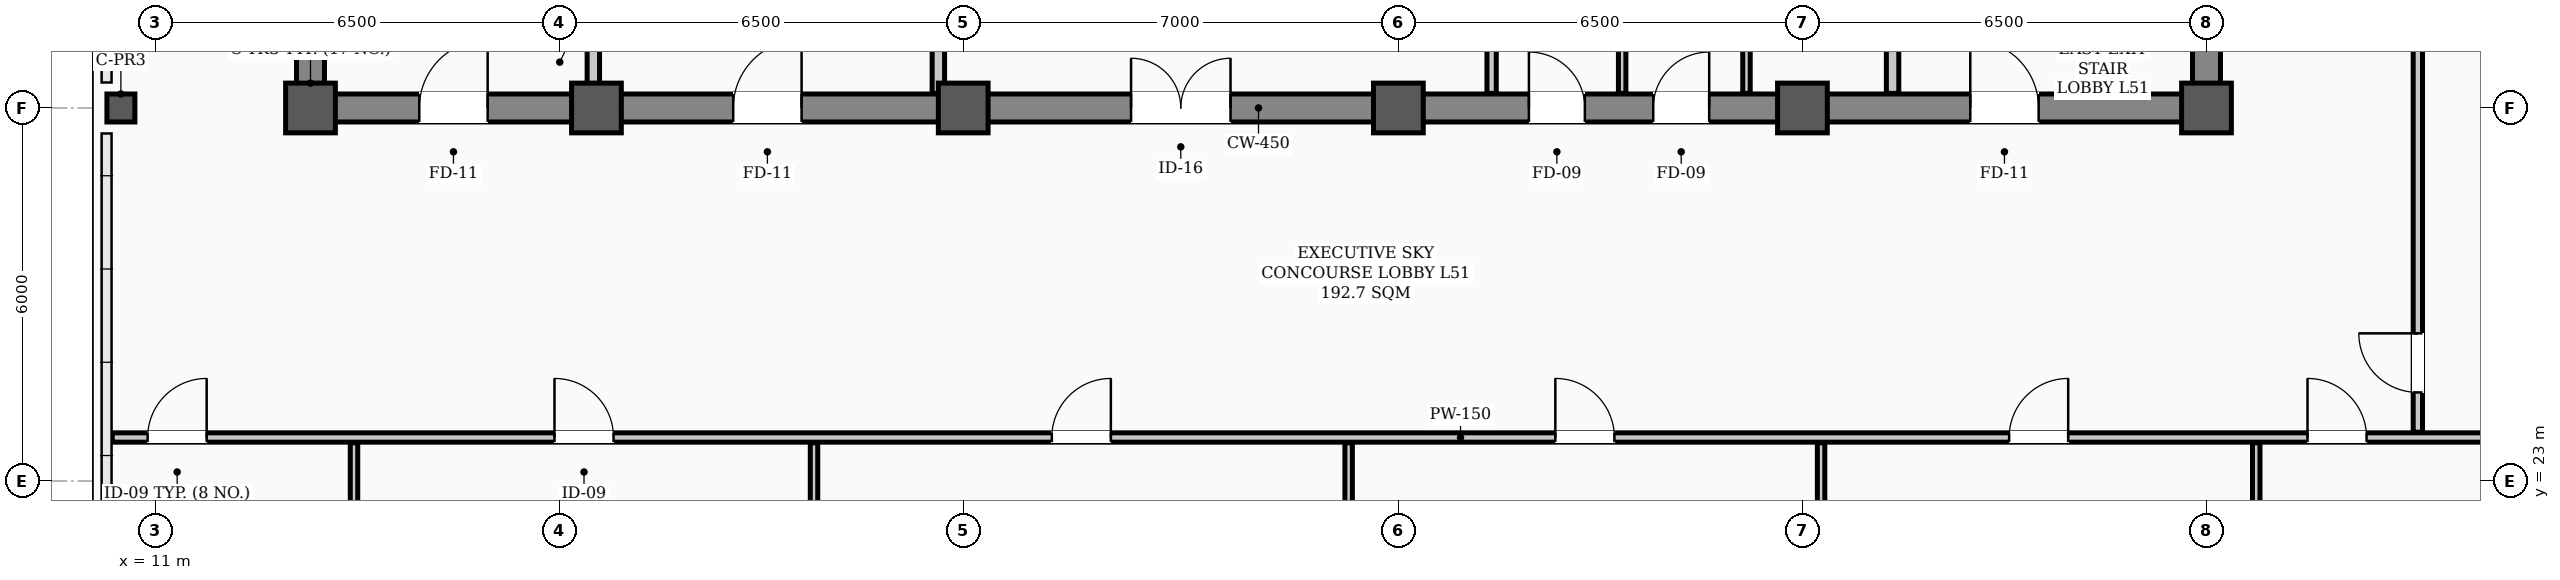
"""IFC4 building model, lengths in metres.
Left out: names, types, materials, properties, quantities, classifications, styles, units other than length and angle.
Written with IfcOpenShell. Run it as: python <this file> out.ifc"""

import sys

from ifc_helpers import new_model, si_unit, direction, frame, frame_2d, origin, origin_2d, place, context, subcontext, project, spatial, rectangle, hollow_rectangle, extrude, element, fill, save


model = new_model("IFC4")
c1 = context("Model", 3, precision=1e-05, world=origin(), true_north=direction((0.0, 1.0)))
c2 = subcontext(c1, "Body", "Model", "MODEL_VIEW")
j1 = project(units=[si_unit("LENGTHUNIT", "METRE"), si_unit("PLANEANGLEUNIT", "RADIAN")], contexts=[c1])
p1 = place(None, origin())
s1 = spatial("IfcSite", under=j1, at=p1, CompositionType="ELEMENT")
p2 = place(p1, origin())
s2 = spatial("IfcBuilding", under=s1, at=p2, CompositionType="ELEMENT")
p3 = place(p2, frame((0.0, 0.0, 206.1)))
s3 = spatial("IfcBuildingStorey", under=s2, at=p3, CompositionType="ELEMENT", Elevation=206.1)
for number, where, z_axis, x_axis in (
    (1, (13.5, 29.0, 0.0), (0.0, 0.0, 1.0), (1.0, 0.0, 0.0)),
    (2, (18.1, 29.0, 0.0), (0.0, 0.0, 1.0), (1.0, 0.0, 0.0)),
    (3, (24.0, 29.0, 0.0), (0.0, 0.0, 1.0), (1.0, 0.0, 0.0)),
    (4, (31.0, 29.0, 0.0), (0.0, 0.0, 1.0), (1.0, 0.0, 0.0)),
    (5, (37.5, 29.0, 0.0), (0.0, 0.0, 1.0), (1.0, 0.0, 0.0)),
    (6, (44.0, 29.0, 0.0), (0.0, 0.0, 1.0), (1.0, 0.0, 0.0)),
):
    element("IfcColumn", number, at=place(p3, frame(where, z_axis=z_axis, x_axis=x_axis)), inside=s3, PredefinedType="COLUMN", context=c2, shape_type="SweptSolid", body=[
        extrude(hollow_rectangle(XDim=0.8, YDim=0.8, WallThickness=0.032, InnerFilletRadius=0.016, OuterFilletRadius=0.048, at=origin_2d()), origin(), (0.0, 0.0, 1.0), 5.0),
    ])
p4 = place(p3, frame((10.45, 29.0, 0.0), z_axis=(0.0, 0.0, 1.0), x_axis=(1.0, 0.0, 0.0)))
e7 = element("IfcColumn", 7, at=p4, inside=s3, PredefinedType="COLUMN", context=c2, shape_type="SweptSolid", body=[
    extrude(hollow_rectangle(XDim=0.45, YDim=0.45, WallThickness=0.022, InnerFilletRadius=0.022, OuterFilletRadius=0.044, at=origin_2d()), origin(), (0.0, 0.0, 1.0), 5.0),
])
p5 = place(p3, frame((13.5, 29.0, 0.0), z_axis=(0.0, 0.0, 1.0), x_axis=(1.0, 0.0, 0.0)))
e8 = element("IfcWall", 8, at=p5, inside=s3, PredefinedType="SHEAR", context=c2, shape_type="SweptSolid", body=[
    extrude(rectangle(XDim=30.5, YDim=0.45, at=frame_2d((15.25, 0.0))), origin(), (0.0, 0.0, 1.0), 4.82),
])
p6 = place(p5, frame((1.75, 0.0, 0.0)))
e9 = element("IfcOpeningElement", 9, at=p6, cuts=e8, PredefinedType="OPENING", context=c2, shape_type="SweptSolid", body=[
    extrude(rectangle(XDim=1.1, YDim=2.08, at=frame_2d((0.55, 1.04))), frame((0.0, 0.235, 0.0), z_axis=(0.0, -1.0, 0.0), x_axis=(1.0, 0.0, 0.0)), (0.0, 0.0, 1.0), 0.47),
])
p7 = place(p5, frame((26.7, 0.0, 0.0)))
e10 = element("IfcOpeningElement", 10, at=p7, cuts=e8, PredefinedType="OPENING", context=c2, shape_type="SweptSolid", body=[
    extrude(rectangle(XDim=1.1, YDim=2.08, at=frame_2d((0.55, 1.04))), frame((0.0, 0.235, 0.0), z_axis=(0.0, -1.0, 0.0), x_axis=(1.0, 0.0, 0.0)), (0.0, 0.0, 1.0), 0.47),
])
p8 = place(p5, frame((6.8, 0.0, 0.0)))
e11 = element("IfcOpeningElement", 11, at=p8, cuts=e8, PredefinedType="OPENING", context=c2, shape_type="SweptSolid", body=[
    extrude(rectangle(XDim=1.1, YDim=2.08, at=frame_2d((0.55, 1.04))), frame((0.0, 0.235, 0.0), z_axis=(0.0, -1.0, 0.0), x_axis=(1.0, 0.0, 0.0)), (0.0, 0.0, 1.0), 0.47),
])
p9 = place(p5, frame((13.2, 0.0, 0.0)))
e12 = element("IfcOpeningElement", 12, at=p9, cuts=e8, PredefinedType="OPENING", context=c2, shape_type="SweptSolid", body=[
    extrude(rectangle(XDim=1.6, YDim=2.08, at=frame_2d((0.8, 1.04))), frame((0.0, 0.235, 0.0), z_axis=(0.0, -1.0, 0.0), x_axis=(1.0, 0.0, 0.0)), (0.0, 0.0, 1.0), 0.47),
])
p10 = place(p5, frame((19.6, 0.0, 0.0)))
e13 = element("IfcOpeningElement", 13, at=p10, cuts=e8, PredefinedType="OPENING", context=c2, shape_type="SweptSolid", body=[
    extrude(rectangle(XDim=0.9, YDim=2.08, at=frame_2d((0.45, 1.04))), frame((0.0, 0.235, 0.0), z_axis=(0.0, -1.0, 0.0), x_axis=(1.0, 0.0, 0.0)), (0.0, 0.0, 1.0), 0.47),
])
p11 = place(p5, frame((21.6, 0.0, 0.0)))
e14 = element("IfcOpeningElement", 14, at=p11, cuts=e8, PredefinedType="OPENING", context=c2, shape_type="SweptSolid", body=[
    extrude(rectangle(XDim=0.9, YDim=2.08, at=frame_2d((0.45, 1.04))), frame((0.0, 0.235, 0.0), z_axis=(0.0, -1.0, 0.0), x_axis=(1.0, 0.0, 0.0)), (0.0, 0.0, 1.0), 0.47),
])
for number, where, z_axis, x_axis in (
    (15, (13.5, 29.35, 0.0), (0.0, 0.0, 1.0), (0.0, 1.0, 0.0)),
    (16, (44.0, 29.35, 0.0), (0.0, 0.0, 1.0), (0.0, 1.0, 0.0)),
):
    element("IfcWall", number, at=place(p3, frame(where, z_axis=z_axis, x_axis=x_axis)), inside=s3, PredefinedType="SHEAR", context=c2, shape_type="SweptSolid", body=[
        extrude(rectangle(XDim=8.6, YDim=0.45, at=frame_2d((4.3, 0.0))), origin(), (0.0, 0.0, 1.0), 4.82),
    ])
p12 = place(p3, frame((10.31, 23.7, 0.0), z_axis=(0.0, 0.0, 1.0), x_axis=(1.0, 0.0, 0.0)))
e17 = element("IfcWall", 17, at=p12, inside=s3, PredefinedType="PARTITIONING", context=c2, shape_type="SweptSolid", body=[
    extrude(rectangle(XDim=43.38, YDim=0.15, at=frame_2d((21.69, 0.0))), origin(), (0.0, 0.0, 1.0), 4.3),
])
p13 = place(p12, frame((0.57, 0.0, 0.0)))
e18 = element("IfcOpeningElement", 18, at=p13, cuts=e17, PredefinedType="OPENING", context=c2, shape_type="SweptSolid", body=[
    extrude(rectangle(XDim=0.95, YDim=2.08, at=frame_2d((0.475, 1.04))), frame((0.0, 0.085, 0.0), z_axis=(0.0, -1.0, 0.0), x_axis=(1.0, 0.0, 0.0)), (0.0, 0.0, 1.0), 0.17),
])
p14 = place(p12, frame((7.115, 0.0, 0.0)))
e19 = element("IfcOpeningElement", 19, at=p14, cuts=e17, PredefinedType="OPENING", context=c2, shape_type="SweptSolid", body=[
    extrude(rectangle(XDim=0.95, YDim=2.08, at=frame_2d((0.475, 1.04))), frame((0.0, 0.085, 0.0), z_axis=(0.0, -1.0, 0.0), x_axis=(1.0, 0.0, 0.0)), (0.0, 0.0, 1.0), 0.17),
])
p15 = place(p12, frame((15.115, 0.0, 0.0)))
e20 = element("IfcOpeningElement", 20, at=p15, cuts=e17, PredefinedType="OPENING", context=c2, shape_type="SweptSolid", body=[
    extrude(rectangle(XDim=0.95, YDim=2.08, at=frame_2d((0.475, 1.04))), frame((0.0, 0.085, 0.0), z_axis=(0.0, -1.0, 0.0), x_axis=(1.0, 0.0, 0.0)), (0.0, 0.0, 1.0), 0.17),
])
p16 = place(p12, frame((23.215, 0.0, 0.0)))
e21 = element("IfcOpeningElement", 21, at=p16, cuts=e17, PredefinedType="OPENING", context=c2, shape_type="SweptSolid", body=[
    extrude(rectangle(XDim=0.95, YDim=2.08, at=frame_2d((0.475, 1.04))), frame((0.0, 0.085, 0.0), z_axis=(0.0, -1.0, 0.0), x_axis=(1.0, 0.0, 0.0)), (0.0, 0.0, 1.0), 0.17),
])
p17 = place(p12, frame((30.515, 0.0, 0.0)))
e22 = element("IfcOpeningElement", 22, at=p17, cuts=e17, PredefinedType="OPENING", context=c2, shape_type="SweptSolid", body=[
    extrude(rectangle(XDim=0.95, YDim=2.08, at=frame_2d((0.475, 1.04))), frame((0.0, 0.085, 0.0), z_axis=(0.0, -1.0, 0.0), x_axis=(1.0, 0.0, 0.0)), (0.0, 0.0, 1.0), 0.17),
])
p18 = place(p12, frame((35.315, 0.0, 0.0)))
e23 = element("IfcOpeningElement", 23, at=p18, cuts=e17, PredefinedType="OPENING", context=c2, shape_type="SweptSolid", body=[
    extrude(rectangle(XDim=0.95, YDim=2.08, at=frame_2d((0.475, 1.04))), frame((0.0, 0.085, 0.0), z_axis=(0.0, -1.0, 0.0), x_axis=(1.0, 0.0, 0.0)), (0.0, 0.0, 1.0), 0.17),
])
for number, where, z_axis, x_axis in (
    (24, (18.05, 29.235, 0.0), (0.0, 0.0, 1.0), (0.0, 1.0, 0.0)),
    (25, (38.95, 29.235, 0.0), (0.0, 0.0, 1.0), (0.0, 1.0, 0.0)),
):
    element("IfcWall", number, at=place(p3, frame(where, z_axis=z_axis, x_axis=x_axis)), inside=s3, PredefinedType="STANDARD", context=c2, shape_type="SweptSolid", body=[
        extrude(rectangle(XDim=1.065, YDim=0.2, at=frame_2d((0.532, 0.0))), origin(), (0.0, 0.0, 1.0), 4.45),
    ])
p19 = place(p3, frame((23.6, 29.235, 0.0), z_axis=(0.0, 0.0, 1.0), x_axis=(0.0, 1.0, 0.0)))
e26 = element("IfcWall", 26, at=p19, inside=s3, PredefinedType="STANDARD", context=c2, shape_type="SweptSolid", body=[
    extrude(rectangle(XDim=5.465, YDim=0.2, at=frame_2d((2.732, 0.0))), origin(), (0.0, 0.0, 1.0), 4.3),
])
p20 = place(p3, frame((32.5, 29.235, 0.0), z_axis=(0.0, 0.0, 1.0), x_axis=(0.0, 1.0, 0.0)))
e27 = element("IfcWall", 27, at=p20, inside=s3, PredefinedType="PARTITIONING", context=c2, shape_type="SweptSolid", body=[
    extrude(rectangle(XDim=2.53, YDim=0.15, at=frame_2d((1.265, 0.0))), origin(), (0.0, 0.0, 1.0), 4.45),
])
for number, where, z_axis, x_axis in (
    (28, (36.6, 29.235, 0.0), (0.0, 0.0, 1.0), (0.0, 1.0, 0.0)),
    (29, (34.6, 29.235, 0.0), (0.0, 0.0, 1.0), (0.0, 1.0, 0.0)),
):
    element("IfcWall", number, at=place(p3, frame(where, z_axis=z_axis, x_axis=x_axis)), inside=s3, PredefinedType="PARTITIONING", context=c2, shape_type="SweptSolid", body=[
        extrude(rectangle(XDim=2.53, YDim=0.12, at=frame_2d((1.265, 0.0))), origin(), (0.0, 0.0, 1.0), 4.45),
    ])
p21 = place(p3, frame((47.4, 23.785, 0.0), z_axis=(0.0, 0.0, 1.0), x_axis=(0.0, 1.0, 0.0)))
e30 = element("IfcWall", 30, at=p21, inside=s3, PredefinedType="PARTITIONING", context=c2, shape_type="SweptSolid", body=[
    extrude(rectangle(XDim=13.13, YDim=0.15, at=frame_2d((6.565, 0.0))), origin(), (0.0, 0.0, 1.0), 4.2),
])
p22 = place(p21, frame((0.64, 0.0, 0.0)))
e31 = element("IfcOpeningElement", 31, at=p22, cuts=e30, PredefinedType="OPENING", context=c2, shape_type="SweptSolid", body=[
    extrude(rectangle(XDim=0.95, YDim=2.08, at=frame_2d((0.475, 1.04))), frame((0.0, 0.085, 0.0), z_axis=(0.0, -1.0, 0.0), x_axis=(1.0, 0.0, 0.0)), (0.0, 0.0, 1.0), 0.17),
])
p23 = place(p3, frame((14.2, 11.56, 0.0), z_axis=(0.0, 0.0, 1.0), x_axis=(0.0, 1.0, 0.0)))
e32 = element("IfcWall", 32, at=p23, inside=s3, PredefinedType="PARTITIONING", context=c2, shape_type="SweptSolid", body=[
    extrude(rectangle(XDim=12.055, YDim=0.12, at=frame_2d((6.027, 0.0))), origin(), (0.0, 0.0, 1.0), 4.2),
])
p24 = place(p3, frame((21.6, 13.32, 0.0), z_axis=(0.0, 0.0, 1.0), x_axis=(0.0, 1.0, 0.0)))
e33 = element("IfcWall", 33, at=p24, inside=s3, PredefinedType="PARTITIONING", context=c2, shape_type="SweptSolid", body=[
    extrude(rectangle(XDim=10.295, YDim=0.12, at=frame_2d((5.147, 0.0))), origin(), (0.0, 0.0, 1.0), 4.2),
])
for number, where, z_axis, x_axis in (
    (34, (30.2, 11.56, 0.0), (0.0, 0.0, 1.0), (0.0, 1.0, 0.0)),
    (35, (37.8, 11.56, 0.0), (0.0, 0.0, 1.0), (0.0, 1.0, 0.0)),
    (36, (44.8, 11.56, 0.0), (0.0, 0.0, 1.0), (0.0, 1.0, 0.0)),
):
    element("IfcWall", number, at=place(p3, frame(where, z_axis=z_axis, x_axis=x_axis)), inside=s3, PredefinedType="PARTITIONING", context=c2, shape_type="SweptSolid", body=[
        extrude(rectangle(XDim=12.055, YDim=0.12, at=frame_2d((6.027, 0.0))), origin(), (0.0, 0.0, 1.0), 4.2),
    ])
p25 = place(p6, origin())
e37 = element("IfcDoor", 37, at=p25, inside=s3, OperationType="SINGLE_SWING_RIGHT", PredefinedType="DOOR", context=c2, shape_type="SweptSolid", body=[
    extrude(rectangle(XDim=1.1, YDim=2.08, at=frame_2d((0.55, 1.04))), frame((0.0, 0.025, 0.0), z_axis=(0.0, -1.0, 0.0), x_axis=(1.0, 0.0, 0.0)), (0.0, 0.0, 1.0), 0.05),
])
fill(e9, e37)
p26 = place(p7, origin())
e38 = element("IfcDoor", 38, at=p26, inside=s3, OperationType="SINGLE_SWING_LEFT", PredefinedType="DOOR", context=c2, shape_type="SweptSolid", body=[
    extrude(rectangle(XDim=1.1, YDim=2.08, at=frame_2d((0.55, 1.04))), frame((0.0, 0.025, 0.0), z_axis=(0.0, -1.0, 0.0), x_axis=(1.0, 0.0, 0.0)), (0.0, 0.0, 1.0), 0.05),
])
fill(e10, e38)
p27 = place(p8, origin())
e39 = element("IfcDoor", 39, at=p27, inside=s3, OperationType="SINGLE_SWING_RIGHT", PredefinedType="DOOR", context=c2, shape_type="SweptSolid", body=[
    extrude(rectangle(XDim=1.1, YDim=2.08, at=frame_2d((0.55, 1.04))), frame((0.0, 0.025, 0.0), z_axis=(0.0, -1.0, 0.0), x_axis=(1.0, 0.0, 0.0)), (0.0, 0.0, 1.0), 0.05),
])
fill(e11, e39)
p28 = place(p9, origin())
e40 = element("IfcDoor", 40, at=p28, inside=s3, OperationType="DOUBLE_DOOR_SINGLE_SWING", PredefinedType="DOOR", context=c2, shape_type="SweptSolid", body=[
    extrude(rectangle(XDim=1.6, YDim=2.08, at=frame_2d((0.8, 1.04))), frame((0.0, 0.025, 0.0), z_axis=(0.0, -1.0, 0.0), x_axis=(1.0, 0.0, 0.0)), (0.0, 0.0, 1.0), 0.05),
])
fill(e12, e40)
p29 = place(p10, origin())
e41 = element("IfcDoor", 41, at=p29, inside=s3, OperationType="SINGLE_SWING_LEFT", PredefinedType="DOOR", context=c2, shape_type="SweptSolid", body=[
    extrude(rectangle(XDim=0.9, YDim=2.08, at=frame_2d((0.45, 1.04))), frame((0.0, 0.025, 0.0), z_axis=(0.0, -1.0, 0.0), x_axis=(1.0, 0.0, 0.0)), (0.0, 0.0, 1.0), 0.05),
])
fill(e13, e41)
p30 = place(p11, origin())
e42 = element("IfcDoor", 42, at=p30, inside=s3, OperationType="SINGLE_SWING_RIGHT", PredefinedType="DOOR", context=c2, shape_type="SweptSolid", body=[
    extrude(rectangle(XDim=0.9, YDim=2.08, at=frame_2d((0.45, 1.04))), frame((0.0, 0.025, 0.0), z_axis=(0.0, -1.0, 0.0), x_axis=(1.0, 0.0, 0.0)), (0.0, 0.0, 1.0), 0.05),
])
fill(e14, e42)
p31 = place(p13, origin())
e43 = element("IfcDoor", 43, at=p31, inside=s3, OperationType="SINGLE_SWING_RIGHT", PredefinedType="DOOR", context=c2, shape_type="SweptSolid", body=[
    extrude(rectangle(XDim=0.95, YDim=2.08, at=frame_2d((0.475, 1.04))), frame((0.0, 0.025, 0.0), z_axis=(0.0, -1.0, 0.0), x_axis=(1.0, 0.0, 0.0)), (0.0, 0.0, 1.0), 0.05),
])
fill(e18, e43)
p32 = place(p14, origin())
e44 = element("IfcDoor", 44, at=p32, inside=s3, OperationType="SINGLE_SWING_LEFT", PredefinedType="DOOR", context=c2, shape_type="SweptSolid", body=[
    extrude(rectangle(XDim=0.95, YDim=2.08, at=frame_2d((0.475, 1.04))), frame((0.0, 0.025, 0.0), z_axis=(0.0, -1.0, 0.0), x_axis=(1.0, 0.0, 0.0)), (0.0, 0.0, 1.0), 0.05),
])
fill(e19, e44)
p33 = place(p15, origin())
e45 = element("IfcDoor", 45, at=p33, inside=s3, OperationType="SINGLE_SWING_RIGHT", PredefinedType="DOOR", context=c2, shape_type="SweptSolid", body=[
    extrude(rectangle(XDim=0.95, YDim=2.08, at=frame_2d((0.475, 1.04))), frame((0.0, 0.025, 0.0), z_axis=(0.0, -1.0, 0.0), x_axis=(1.0, 0.0, 0.0)), (0.0, 0.0, 1.0), 0.05),
])
fill(e20, e45)
p34 = place(p16, origin())
e46 = element("IfcDoor", 46, at=p34, inside=s3, OperationType="SINGLE_SWING_LEFT", PredefinedType="DOOR", context=c2, shape_type="SweptSolid", body=[
    extrude(rectangle(XDim=0.95, YDim=2.08, at=frame_2d((0.475, 1.04))), frame((0.0, 0.025, 0.0), z_axis=(0.0, -1.0, 0.0), x_axis=(1.0, 0.0, 0.0)), (0.0, 0.0, 1.0), 0.05),
])
fill(e21, e46)
p35 = place(p17, origin())
e47 = element("IfcDoor", 47, at=p35, inside=s3, OperationType="SINGLE_SWING_RIGHT", PredefinedType="DOOR", context=c2, shape_type="SweptSolid", body=[
    extrude(rectangle(XDim=0.95, YDim=2.08, at=frame_2d((0.475, 1.04))), frame((0.0, 0.025, 0.0), z_axis=(0.0, -1.0, 0.0), x_axis=(1.0, 0.0, 0.0)), (0.0, 0.0, 1.0), 0.05),
])
fill(e22, e47)
p36 = place(p18, origin())
e48 = element("IfcDoor", 48, at=p36, inside=s3, OperationType="SINGLE_SWING_LEFT", PredefinedType="DOOR", context=c2, shape_type="SweptSolid", body=[
    extrude(rectangle(XDim=0.95, YDim=2.08, at=frame_2d((0.475, 1.04))), frame((0.0, 0.025, 0.0), z_axis=(0.0, -1.0, 0.0), x_axis=(1.0, 0.0, 0.0)), (0.0, 0.0, 1.0), 0.05),
])
fill(e23, e48)
p37 = place(p22, origin())
e49 = element("IfcDoor", 49, at=p37, inside=s3, OperationType="SINGLE_SWING_RIGHT", PredefinedType="DOOR", context=c2, shape_type="SweptSolid", body=[
    extrude(rectangle(XDim=0.95, YDim=2.08, at=frame_2d((0.475, 1.04))), frame((0.0, 0.025, 0.0), z_axis=(0.0, -1.0, 0.0), x_axis=(1.0, 0.0, 0.0)), (0.0, 0.0, 1.0), 0.05),
])
fill(e31, e49)
save(model, sys.argv[1])
